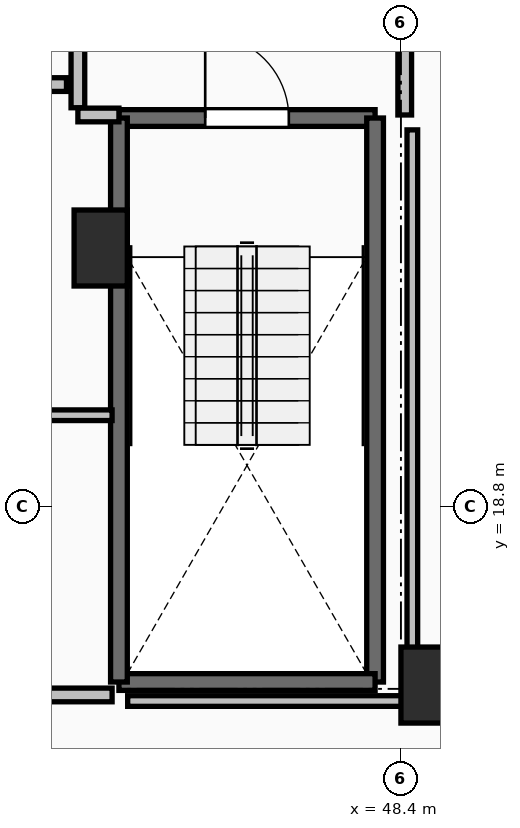
"""IFC4 building model, lengths in metres.
Left out: names, types, materials, properties, quantities, classifications, styles, units other than length and angle.
Written with IfcOpenShell. Run it as: python <this file> out.ifc"""

import sys

from ifc_helpers import new_model, si_unit, direction, frame, frame_2d, origin, origin_2d, place, context, subcontext, project, spatial, rectangle, extrude, element, fill, save


model = new_model("IFC4")
c1 = context("Model", 3, precision=1e-05, world=origin(), true_north=direction((0.0, 1.0)))
c2 = subcontext(c1, "Body", "Model", "MODEL_VIEW")
j1 = project(units=[si_unit("LENGTHUNIT", "METRE"), si_unit("PLANEANGLEUNIT", "RADIAN")], contexts=[c1])
p1 = place(None, origin())
s1 = spatial("IfcSite", under=j1, at=p1, CompositionType="ELEMENT")
p2 = place(p1, origin())
s2 = spatial("IfcBuilding", under=s1, at=p2, CompositionType="ELEMENT")
p3 = place(p2, frame((0.0, 0.0, 179.1)))
s3 = spatial("IfcBuildingStorey", under=s2, at=p3, CompositionType="ELEMENT", Elevation=179.1)
for number, where, z_axis, x_axis in (
    (1, (48.75, 16.45, 0.0), (0.0, 0.0, 1.0), (1.0, 0.0, 0.0)),
    (2, (44.45, 22.2, 0.0), (0.0, 0.0, 1.0), (1.0, 0.0, 0.0)),
):
    element("IfcColumn", number, at=place(p3, frame(where, z_axis=z_axis, x_axis=x_axis)), inside=s3, PredefinedType="PILASTER", context=c2, shape_type="SweptSolid", body=[
        extrude(rectangle(XDim=0.7, YDim=1.0, at=origin_2d()), origin(), (0.0, 0.0, 1.0), 3.5),
    ])
p4 = place(p3, frame((44.69, 23.91, 0.0), z_axis=(0.0, 0.0, 1.0), x_axis=(1.0, 0.0, 0.0)))
e3 = element("IfcWall", 3, at=p4, inside=s3, PredefinedType="SOLIDWALL", context=c2, shape_type="SweptSolid", body=[
    extrude(rectangle(XDim=3.37, YDim=0.22, at=frame_2d((1.685, 0.0))), origin(), (0.0, 0.0, 1.0), 3.24),
])
p5 = place(p4, frame((1.135, 0.0, 0.0)))
e4 = element("IfcOpeningElement", 4, at=p5, cuts=e3, PredefinedType="OPENING", context=c2, shape_type="SweptSolid", body=[
    extrude(rectangle(XDim=1.1, YDim=2.15, at=frame_2d((0.55, 1.075))), frame((0.0, 0.125, 0.0), z_axis=(0.0, -1.0, 0.0), x_axis=(1.0, 0.0, 0.0)), (0.0, 0.0, 1.0), 0.25),
])
p6 = place(p3, frame((48.06, 23.91, 0.0), z_axis=(0.0, 0.0, 1.0), x_axis=(0.0, -1.0, 0.0)))
e5 = element("IfcWall", 5, at=p6, inside=s3, PredefinedType="SOLIDWALL", context=c2, shape_type="SweptSolid", body=[
    extrude(rectangle(XDim=7.42, YDim=0.22, at=frame_2d((3.71, 0.0))), origin(), (0.0, 0.0, 1.0), 3.24),
])
p7 = place(p3, frame((48.06, 16.49, 0.0), z_axis=(0.0, 0.0, 1.0), x_axis=(-1.0, 0.0, 0.0)))
e6 = element("IfcWall", 6, at=p7, inside=s3, PredefinedType="SOLIDWALL", context=c2, shape_type="SweptSolid", body=[
    extrude(rectangle(XDim=3.37, YDim=0.22, at=frame_2d((1.685, 0.0))), origin(), (0.0, 0.0, 1.0), 3.24),
])
p8 = place(p3, frame((44.69, 16.49, 0.0), z_axis=(0.0, 0.0, 1.0), x_axis=(0.0, 1.0, 0.0)))
e7 = element("IfcWall", 7, at=p8, inside=s3, PredefinedType="SOLIDWALL", context=c2, shape_type="SweptSolid", body=[
    extrude(rectangle(XDim=7.42, YDim=0.22, at=frame_2d((3.71, 0.0))), origin(), (0.0, 0.0, 1.0), 3.24),
])
p9 = place(p3, frame((44.15, 27.955, 0.0), z_axis=(0.0, 0.0, 1.0), x_axis=(0.0, -1.0, 0.0)))
e8 = element("IfcWall", 8, at=p9, inside=s3, PredefinedType="PARTITIONING", context=c2, shape_type="SweptSolid", body=[
    extrude(rectangle(XDim=3.91, YDim=0.18, at=frame_2d((1.955, 0.0))), origin(), (0.0, 0.0, 1.0), 3.24),
])
p10 = place(p9, frame((1.355, 0.0, 0.0)))
e9 = element("IfcOpeningElement", 9, at=p10, cuts=e8, PredefinedType="OPENING", context=c2, shape_type="SweptSolid", body=[
    extrude(rectangle(XDim=1.2, YDim=2.15, at=frame_2d((0.6, 1.075))), frame((0.0, 0.105, 0.0), z_axis=(0.0, -1.0, 0.0), x_axis=(1.0, 0.0, 0.0)), (0.0, 0.0, 1.0), 0.21),
])
p11 = place(p3, frame((44.15, 23.95, 0.0), z_axis=(0.0, 0.0, 1.0), x_axis=(1.0, 0.0, 0.0)))
e10 = element("IfcWall", 10, at=p11, inside=s3, PredefinedType="PARTITIONING", context=c2, shape_type="SweptSolid", body=[
    extrude(rectangle(XDim=0.54, YDim=0.18, at=frame_2d((0.27, 0.0))), origin(), (0.0, 0.0, 1.0), 3.24),
])
p12 = place(p3, frame((48.45, 23.95, 0.0), z_axis=(0.0, 0.0, 1.0), x_axis=(0.0, 1.0, 0.0)))
e11 = element("IfcWall", 11, at=p12, inside=s3, PredefinedType="PARTITIONING", context=c2, shape_type="SweptSolid", body=[
    extrude(rectangle(XDim=4.05, YDim=0.18, at=frame_2d((2.025, 0.0))), origin(), (0.0, 0.0, 1.0), 3.24),
])
p13 = place(p12, frame((1.425, 0.0, 0.0)))
e12 = element("IfcOpeningElement", 12, at=p13, cuts=e11, PredefinedType="OPENING", context=c2, shape_type="SweptSolid", body=[
    extrude(rectangle(XDim=1.2, YDim=2.15, at=frame_2d((0.6, 1.075))), frame((0.0, 0.105, 0.0), z_axis=(0.0, -1.0, 0.0), x_axis=(1.0, 0.0, 0.0)), (0.0, 0.0, 1.0), 0.21),
])
p14 = place(p3, frame((41.555, 24.35, 0.0), z_axis=(0.0, 0.0, 1.0), x_axis=(1.0, 0.0, 0.0)))
e13 = element("IfcWall", 13, at=p14, inside=s3, PredefinedType="PARTITIONING", context=c2, shape_type="SweptSolid", body=[
    extrude(rectangle(XDim=2.445, YDim=0.18, at=frame_2d((1.223, 0.0))), origin(), (0.0, 0.0, 1.0), 3.24),
])
p15 = place(p14, frame((0.798, 0.0, 0.0)))
e14 = element("IfcOpeningElement", 14, at=p15, cuts=e13, PredefinedType="OPENING", context=c2, shape_type="SweptSolid", body=[
    extrude(rectangle(XDim=0.85, YDim=2.1, at=frame_2d((0.425, 1.05))), frame((0.0, 0.105, 0.0), z_axis=(0.0, -1.0, 0.0), x_axis=(1.0, 0.0, 0.0)), (0.0, 0.0, 1.0), 0.21),
])
p16 = place(p3, frame((44.6, 20.0, 0.0), z_axis=(0.0, 0.0, 1.0), x_axis=(-1.0, 0.0, 0.0)))
e15 = element("IfcWall", 15, at=p16, inside=s3, PredefinedType="PARTITIONING", context=c2, shape_type="SweptSolid", body=[
    extrude(rectangle(XDim=3.2, YDim=0.14, at=frame_2d((1.6, 0.0))), origin(), (0.0, 0.0, 1.0), 3.24),
])
p17 = place(p3, frame((41.4, 16.32, 0.0), z_axis=(0.0, 0.0, 1.0), x_axis=(1.0, 0.0, 0.0)))
e16 = element("IfcWall", 16, at=p17, inside=s3, PredefinedType="PARTITIONING", context=c2, shape_type="SweptSolid", body=[
    extrude(rectangle(XDim=3.2, YDim=0.18, at=frame_2d((1.6, 0.0))), origin(), (0.0, 0.0, 1.0), 3.24),
])
p18 = place(p17, frame((1.2, 0.0, 0.0)))
e17 = element("IfcOpeningElement", 17, at=p18, cuts=e16, PredefinedType="OPENING", context=c2, shape_type="SweptSolid", body=[
    extrude(rectangle(XDim=0.8, YDim=2.05, at=frame_2d((0.4, 1.025))), frame((0.0, 0.105, 0.0), z_axis=(0.0, -1.0, 0.0), x_axis=(1.0, 0.0, 0.0)), (0.0, 0.0, 1.0), 0.21),
])
p19 = place(p3, frame((44.805, 16.24, 0.0), z_axis=(0.0, 0.0, 1.0), x_axis=(1.0, 0.0, 0.0)))
e18 = element("IfcWall", 18, at=p19, inside=s3, PredefinedType="PARTITIONING", context=c2, shape_type="SweptSolid", body=[
    extrude(rectangle(XDim=3.745, YDim=0.14, at=frame_2d((1.873, 0.0))), origin(), (0.0, 0.0, 1.0), 2.432),
])
p20 = place(p3, frame((48.55, 16.24, 0.0), z_axis=(0.0, 0.0, 1.0), x_axis=(0.0, 1.0, 0.0)))
e19 = element("IfcWall", 19, at=p20, inside=s3, PredefinedType="PARTITIONING", context=c2, shape_type="SweptSolid", body=[
    extrude(rectangle(XDim=7.514, YDim=0.14, at=frame_2d((3.757, 0.0))), origin(), (0.0, 0.0, 1.0), 2.432),
])
p21 = place(p5, origin())
e20 = element("IfcDoor", 20, at=p21, inside=s3, OperationType="SINGLE_SWING_LEFT", PredefinedType="DOOR", context=c2, shape_type="SweptSolid", body=[
    extrude(rectangle(XDim=1.1, YDim=2.15, at=frame_2d((0.55, 1.075))), frame((0.0, 0.025, 0.0), z_axis=(0.0, -1.0, 0.0), x_axis=(1.0, 0.0, 0.0)), (0.0, 0.0, 1.0), 0.05),
])
fill(e4, e20)
save(model, sys.argv[1])
